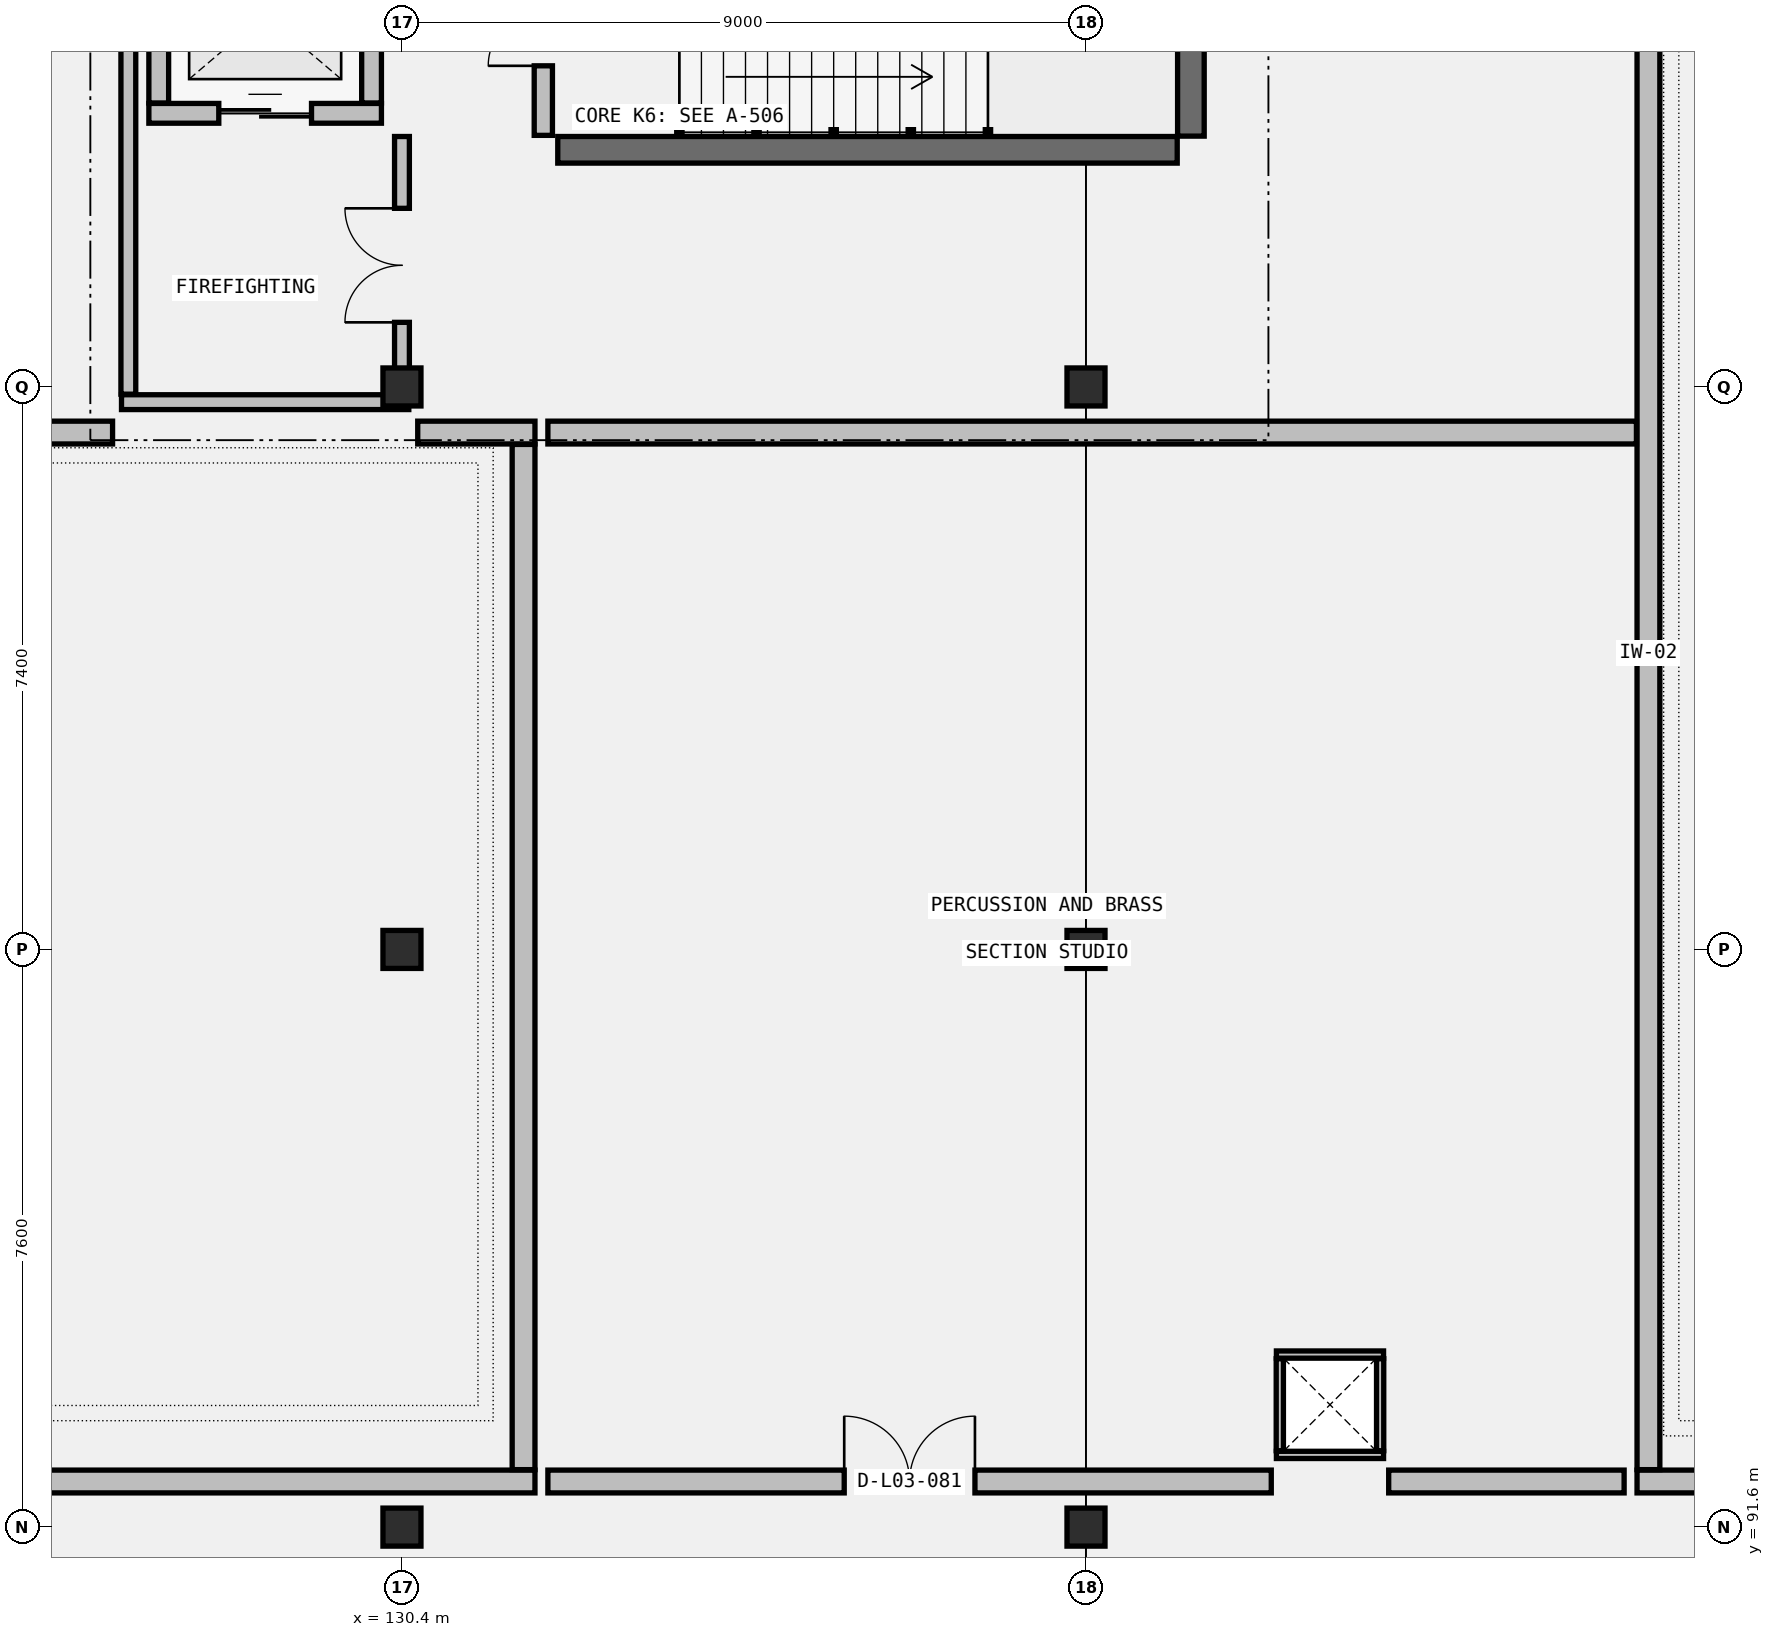
"""IFC4 building model, lengths in metres.
Left out: names, types, materials, properties, quantities, classifications, styles, units other than length and angle.
Written with IfcOpenShell. Run it as: python <this file> out.ifc"""

import sys

from ifc_helpers import new_model, si_unit, direction, frame, frame_2d, origin, origin_2d, place, context, subcontext, project, spatial, rectangle, extrude, element, fill, save


model = new_model("IFC4")
c1 = context("Model", 3, precision=1e-05, world=origin(), true_north=direction((0.0, 1.0)))
c2 = subcontext(c1, "Body", "Model", "MODEL_VIEW")
j1 = project(units=[si_unit("LENGTHUNIT", "METRE"), si_unit("PLANEANGLEUNIT", "RADIAN")], contexts=[c1])
p1 = place(None, origin())
s1 = spatial("IfcSite", under=j1, at=p1, CompositionType="ELEMENT")
p2 = place(p1, origin())
s2 = spatial("IfcBuilding", under=s1, at=p2, CompositionType="ELEMENT")
p3 = place(p2, frame((0.0, 0.0, 14.6)))
s3 = spatial("IfcBuildingStorey", under=s2, at=p3, CompositionType="ELEMENT", Elevation=14.6)
for number, where, z_axis, x_axis in (
    (1, (130.4, 91.6, 0.0), (0.0, 0.0, 1.0), (1.0, 0.0, 0.0)),
    (2, (130.4, 99.2, 0.0), (0.0, 0.0, 1.0), (1.0, 0.0, 0.0)),
    (3, (130.4, 106.6, 0.0), (0.0, 0.0, 1.0), (1.0, 0.0, 0.0)),
    (4, (139.4, 91.6, 0.0), (0.0, 0.0, 1.0), (1.0, 0.0, 0.0)),
    (5, (139.4, 99.2, 0.0), (0.0, 0.0, 1.0), (1.0, 0.0, 0.0)),
    (6, (139.4, 106.6, 0.0), (0.0, 0.0, 1.0), (1.0, 0.0, 0.0)),
):
    element("IfcColumn", number, at=place(p3, frame(where, z_axis=z_axis, x_axis=x_axis)), inside=s3, PredefinedType="COLUMN", context=c2, shape_type="SweptSolid", body=[
        extrude(rectangle(XDim=0.5, YDim=0.5, at=origin_2d()), origin(), (0.0, 0.0, 1.0), 4.6),
    ])
p4 = place(p3, frame((132.45, 109.72, 0.0), z_axis=(0.0, 0.0, 1.0), x_axis=(1.0, 0.0, 0.0)))
e7 = element("IfcWall", 7, at=p4, inside=s3, PredefinedType="SHEAR", context=c2, shape_type="SweptSolid", body=[
    extrude(rectangle(XDim=8.15, YDim=0.35, at=frame_2d((4.075, 0.0))), origin(), (0.0, 0.0, 1.0), 4.36),
])
p5 = place(p3, frame((140.78, 109.9, 0.0), z_axis=(0.0, 0.0, 1.0), x_axis=(0.0, 1.0, 0.0)))
e8 = element("IfcWall", 8, at=p5, inside=s3, PredefinedType="SHEAR", context=c2, shape_type="SweptSolid", body=[
    extrude(rectangle(XDim=3.3, YDim=0.35, at=frame_2d((1.65, 0.0))), origin(), (0.0, 0.0, 1.0), 4.36),
])
for number, where, z_axis, x_axis in (
    (9, (141.905, 92.55, 0.0), (0.0, 0.0, 1.0), (1.0, 0.0, 0.0)),
    (10, (141.905, 93.87, 0.0), (0.0, 0.0, 1.0), (1.0, 0.0, 0.0)),
):
    element("IfcWall", number, at=place(p3, frame(where, z_axis=z_axis, x_axis=x_axis)), inside=s3, PredefinedType="PARTITIONING", context=c2, shape_type="SweptSolid", body=[
        extrude(rectangle(XDim=1.41, YDim=0.095, at=frame_2d((0.705, 0.0))), origin(), (0.0, 0.0, 1.0), 4.36),
    ])
for number, where, z_axis, x_axis in (
    (11, (141.95, 92.605, 0.0), (0.0, 0.0, 1.0), (0.0, 1.0, 0.0)),
    (12, (143.27, 92.605, 0.0), (0.0, 0.0, 1.0), (0.0, 1.0, 0.0)),
):
    element("IfcWall", number, at=place(p3, frame(where, z_axis=z_axis, x_axis=x_axis)), inside=s3, PredefinedType="PARTITIONING", context=c2, shape_type="SweptSolid", body=[
        extrude(rectangle(XDim=1.21, YDim=0.095, at=frame_2d((0.605, 0.0))), origin(), (0.0, 0.0, 1.0), 4.36),
    ])
p6 = place(p3, frame((132.26, 109.91, 0.0), z_axis=(0.0, 0.0, 1.0), x_axis=(0.0, 1.0, 0.0)))
e13 = element("IfcWall", 13, at=p6, inside=s3, PredefinedType="STANDARD", context=c2, shape_type="SweptSolid", body=[
    extrude(rectangle(XDim=3.28, YDim=0.24, at=frame_2d((1.64, 0.0))), origin(), (0.0, 0.0, 1.0), 4.36),
])
p7 = place(p6, frame((0.915, 0.0, 0.0)))
e14 = element("IfcOpeningElement", 14, at=p7, cuts=e13, PredefinedType="OPENING", context=c2, shape_type="SweptSolid", body=[
    extrude(rectangle(XDim=1.45, YDim=2.2, at=frame_2d((0.725, 1.1))), frame((0.0, 0.13, 0.0), z_axis=(0.0, -1.0, 0.0), x_axis=(1.0, 0.0, 0.0)), (0.0, 0.0, 1.0), 0.26),
])
p8 = place(p3, frame((127.07, 110.2, 0.0), z_axis=(0.0, 0.0, 1.0), x_axis=(1.0, 0.0, 0.0)))
e15 = element("IfcWall", 15, at=p8, inside=s3, PredefinedType="STANDARD", context=c2, shape_type="SweptSolid", body=[
    extrude(rectangle(XDim=3.06, YDim=0.26, at=frame_2d((1.53, 0.0))), origin(), (0.0, 0.0, 1.0), 4.36),
])
p9 = place(p8, frame((0.92, 0.0, 0.0)))
e16 = element("IfcOpeningElement", 16, at=p9, cuts=e15, PredefinedType="OPENING", context=c2, shape_type="SweptSolid", body=[
    extrude(rectangle(XDim=1.22, YDim=2.2, at=frame_2d((0.61, 1.1))), frame((0.0, 0.14, 0.0), z_axis=(0.0, -1.0, 0.0), x_axis=(1.0, 0.0, 0.0)), (0.0, 0.0, 1.0), 0.28),
])
for number, where, z_axis, x_axis in (
    (17, (127.2, 110.336, 0.0), (0.0, 0.0, 1.0), (0.0, 1.0, 0.0)),
    (18, (130.0, 110.336, 0.0), (0.0, 0.0, 1.0), (0.0, 1.0, 0.0)),
):
    element("IfcWall", number, at=place(p3, frame(where, z_axis=z_axis, x_axis=x_axis)), inside=s3, PredefinedType="STANDARD", context=c2, shape_type="SweptSolid", body=[
        extrude(rectangle(XDim=2.328, YDim=0.26, at=frame_2d((1.164, 0.0))), origin(), (0.0, 0.0, 1.0), 4.36),
    ])
p10 = place(p3, frame((126.8, 106.505, 0.0), z_axis=(0.0, 0.0, 1.0), x_axis=(0.0, 1.0, 0.0)))
e19 = element("IfcWall", 19, at=p10, inside=s3, PredefinedType="PARTITIONING", context=c2, shape_type="SweptSolid", body=[
    extrude(rectangle(XDim=7.275, YDim=0.195, at=frame_2d((3.638, 0.0))), origin(), (0.0, 0.0, 1.0), 3.898),
])
p11 = place(p3, frame((126.71, 106.4, 0.0), z_axis=(0.0, 0.0, 1.0), x_axis=(1.0, 0.0, 0.0)))
e20 = element("IfcWall", 20, at=p11, inside=s3, PredefinedType="PARTITIONING", context=c2, shape_type="SweptSolid", body=[
    extrude(rectangle(XDim=3.78, YDim=0.195, at=frame_2d((1.89, 0.0))), origin(), (0.0, 0.0, 1.0), 3.898),
])
p12 = place(p3, frame((130.4, 106.505, 0.0), z_axis=(0.0, 0.0, 1.0), x_axis=(0.0, 1.0, 0.0)))
e21 = element("IfcWall", 21, at=p12, inside=s3, PredefinedType="PARTITIONING", context=c2, shape_type="SweptSolid", body=[
    extrude(rectangle(XDim=3.39, YDim=0.195, at=frame_2d((1.695, 0.0))), origin(), (0.0, 0.0, 1.0), 3.898),
])
p13 = place(p12, frame((0.945, 0.0, 0.0)))
e22 = element("IfcOpeningElement", 22, at=p13, cuts=e21, PredefinedType="OPENING", context=c2, shape_type="SweptSolid", body=[
    extrude(rectangle(XDim=1.5, YDim=2.2, at=frame_2d((0.75, 1.1))), frame((0.0, 0.107, 0.0), z_axis=(0.0, -1.0, 0.0), x_axis=(1.0, 0.0, 0.0)), (0.0, 0.0, 1.0), 0.215),
])
p14 = place(p3, frame((130.607, 106.0, 0.0), z_axis=(0.0, 0.0, 1.0), x_axis=(1.0, 0.0, 0.0)))
e23 = element("IfcWall", 23, at=p14, inside=s3, PredefinedType="PARTITIONING", context=c2, shape_type="SweptSolid", body=[
    extrude(rectangle(XDim=1.542, YDim=0.3, at=frame_2d((0.771, 0.0))), origin(), (0.0, 0.0, 1.0), 4.36),
])
p15 = place(p3, frame((112.538, 92.2, 0.0), z_axis=(0.0, 0.0, 1.0), x_axis=(1.0, 0.0, 0.0)))
e24 = element("IfcWall", 24, at=p15, inside=s3, PredefinedType="PARTITIONING", context=c2, shape_type="SweptSolid", body=[
    extrude(rectangle(XDim=19.612, YDim=0.3, at=frame_2d((9.806, 0.0))), origin(), (0.0, 0.0, 1.0), 3.756),
])
p16 = place(p3, frame((112.85, 106.0, 0.0), z_axis=(0.0, 0.0, 1.0), x_axis=(1.0, 0.0, 0.0)))
e25 = element("IfcWall", 25, at=p16, inside=s3, PredefinedType="PARTITIONING", context=c2, shape_type="SweptSolid", body=[
    extrude(rectangle(XDim=13.742, YDim=0.3, at=frame_2d((6.871, 0.0))), origin(), (0.0, 0.0, 1.0), 4.36),
])
p17 = place(p3, frame((132.0, 92.356, 0.0), z_axis=(0.0, 0.0, 1.0), x_axis=(0.0, 1.0, 0.0)))
e26 = element("IfcWall", 26, at=p17, inside=s3, PredefinedType="PARTITIONING", context=c2, shape_type="SweptSolid", body=[
    extrude(rectangle(XDim=13.488, YDim=0.3, at=frame_2d((6.744, 0.0))), origin(), (0.0, 0.0, 1.0), 4.36),
])
p18 = place(p3, frame((146.65, 92.2, 0.0), z_axis=(0.0, 0.0, 1.0), x_axis=(1.0, 0.0, 0.0)))
e27 = element("IfcWall", 27, at=p18, inside=s3, PredefinedType="PARTITIONING", context=c2, shape_type="SweptSolid", body=[
    extrude(rectangle(XDim=19.207, YDim=0.3, at=frame_2d((9.604, 0.0))), origin(), (0.0, 0.0, 1.0), 3.908),
])
p19 = place(p18, frame((8.743, 0.0, 0.0)))
e28 = element("IfcOpeningElement", 28, at=p19, cuts=e27, PredefinedType="OPENING", context=c2, shape_type="SweptSolid", body=[
    extrude(rectangle(XDim=1.72, YDim=2.38, at=frame_2d((0.86, 1.19))), frame((0.0, 0.16, 0.0), z_axis=(0.0, -1.0, 0.0), x_axis=(1.0, 0.0, 0.0)), (0.0, 0.0, 1.0), 0.32),
])
p20 = place(p3, frame((146.8, 92.356, 0.0), z_axis=(0.0, 0.0, 1.0), x_axis=(0.0, 1.0, 0.0)))
e29 = element("IfcWall", 29, at=p20, inside=s3, PredefinedType="PARTITIONING", context=c2, shape_type="SweptSolid", body=[
    extrude(rectangle(XDim=21.481, YDim=0.3, at=frame_2d((10.74, 0.0))), origin(), (0.0, 0.0, 1.0), 3.898),
])
p21 = place(p3, frame((132.32, 92.2, 0.0), z_axis=(0.0, 0.0, 1.0), x_axis=(1.0, 0.0, 0.0)))
e30 = element("IfcWall", 30, at=p21, inside=s3, PredefinedType="PARTITIONING", context=c2, shape_type="SweptSolid", body=[
    extrude(rectangle(XDim=9.517, YDim=0.3, at=frame_2d((4.759, 0.0))), origin(), (0.0, 0.0, 1.0), 3.988),
])
p22 = place(p21, frame((3.899, 0.0, 0.0)))
e31 = element("IfcOpeningElement", 31, at=p22, cuts=e30, PredefinedType="OPENING", context=c2, shape_type="SweptSolid", body=[
    extrude(rectangle(XDim=1.72, YDim=2.38, at=frame_2d((0.86, 1.19))), frame((0.0, 0.16, 0.0), z_axis=(0.0, -1.0, 0.0), x_axis=(1.0, 0.0, 0.0)), (0.0, 0.0, 1.0), 0.32),
])
p23 = place(p3, frame((143.383, 92.2, 0.0), z_axis=(0.0, 0.0, 1.0), x_axis=(1.0, 0.0, 0.0)))
e32 = element("IfcWall", 32, at=p23, inside=s3, PredefinedType="PARTITIONING", context=c2, shape_type="SweptSolid", body=[
    extrude(rectangle(XDim=3.097, YDim=0.3, at=frame_2d((1.549, 0.0))), origin(), (0.0, 0.0, 1.0), 3.988),
])
p24 = place(p3, frame((132.32, 106.0, 0.0), z_axis=(0.0, 0.0, 1.0), x_axis=(1.0, 0.0, 0.0)))
e33 = element("IfcWall", 33, at=p24, inside=s3, PredefinedType="PARTITIONING", context=c2, shape_type="SweptSolid", body=[
    extrude(rectangle(XDim=14.322, YDim=0.3, at=frame_2d((7.161, 0.0))), origin(), (0.0, 0.0, 1.0), 3.988),
])
p25 = place(p7, origin())
e34 = element("IfcDoor", 34, at=p25, inside=s3, OperationType="DOUBLE_DOOR_SINGLE_SWING", PredefinedType="DOOR", context=c2, shape_type="SweptSolid", body=[
    extrude(rectangle(XDim=1.45, YDim=2.2, at=frame_2d((0.725, 1.1))), frame((0.0, 0.025, 0.0), z_axis=(0.0, -1.0, 0.0), x_axis=(1.0, 0.0, 0.0)), (0.0, 0.0, 1.0), 0.05),
])
fill(e14, e34)
p26 = place(p9, origin())
e35 = element("IfcDoor", 35, at=p26, inside=s3, OperationType="SLIDING_TO_RIGHT", PredefinedType="DOOR", context=c2, shape_type="SweptSolid", body=[
    extrude(rectangle(XDim=1.22, YDim=2.2, at=frame_2d((0.61, 1.1))), frame((0.0, 0.025, 0.0), z_axis=(0.0, -1.0, 0.0), x_axis=(1.0, 0.0, 0.0)), (0.0, 0.0, 1.0), 0.05),
])
fill(e16, e35)
p27 = place(p13, origin())
e36 = element("IfcDoor", 36, at=p27, inside=s3, OperationType="DOUBLE_DOOR_SINGLE_SWING", PredefinedType="DOOR", context=c2, shape_type="SweptSolid", body=[
    extrude(rectangle(XDim=1.5, YDim=2.2, at=frame_2d((0.75, 1.1))), frame((0.0, 0.025, 0.0), z_axis=(0.0, -1.0, 0.0), x_axis=(1.0, 0.0, 0.0)), (0.0, 0.0, 1.0), 0.05),
])
fill(e22, e36)
p28 = place(p22, origin())
e37 = element("IfcDoor", 37, at=p28, inside=s3, OperationType="DOUBLE_DOOR_SINGLE_SWING", PredefinedType="DOOR", context=c2, shape_type="SweptSolid", body=[
    extrude(rectangle(XDim=1.72, YDim=2.38, at=frame_2d((0.86, 1.19))), frame((0.0, 0.025, 0.0), z_axis=(0.0, -1.0, 0.0), x_axis=(1.0, 0.0, 0.0)), (0.0, 0.0, 1.0), 0.05),
])
fill(e31, e37)
save(model, sys.argv[1])
